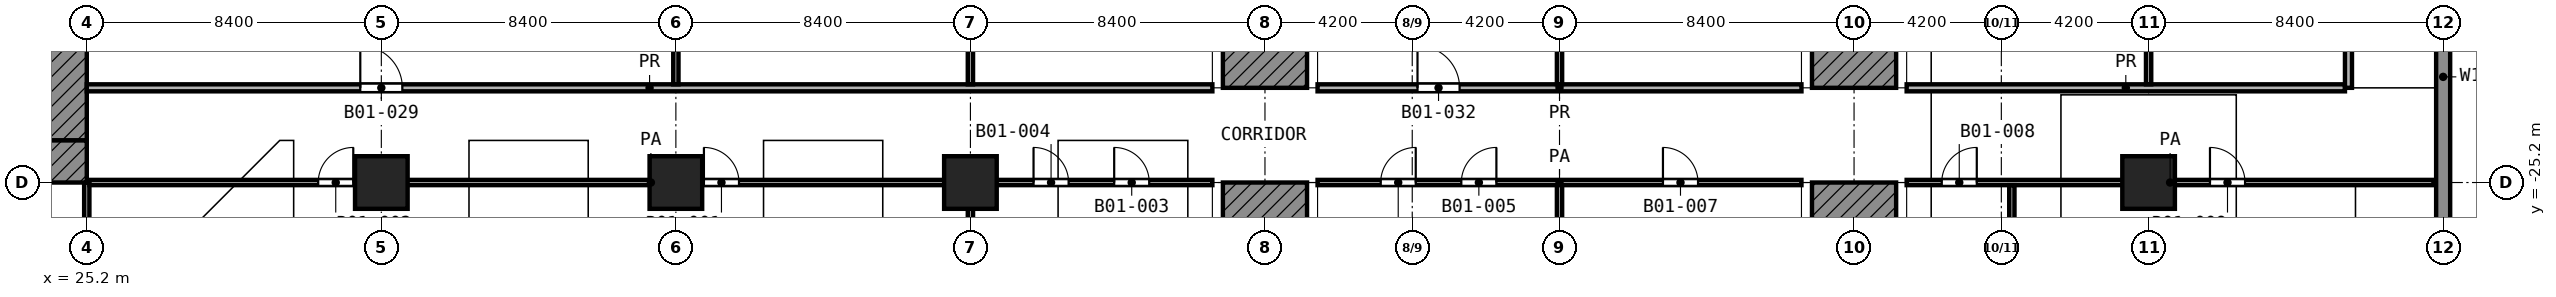
"""IFC4 building model, lengths in metres.
Left out: names, types, materials, properties, quantities, classifications, styles, units other than length and angle.
Written with IfcOpenShell. Run it as: python <this file> out.ifc"""

import sys

from ifc_helpers import new_model, si_unit, direction, frame, frame_2d, origin, origin_2d, place, context, subcontext, project, spatial, polyline, rectangle, outline, extrude, element, fill, save


model = new_model("IFC4")
c1 = context("Model", 3, precision=1e-05, world=origin(), true_north=direction((0.0, 1.0)))
c2 = subcontext(c1, "Body", "Model", "MODEL_VIEW")
j1 = project(units=[si_unit("LENGTHUNIT", "METRE"), si_unit("PLANEANGLEUNIT", "RADIAN")], contexts=[c1])
p1 = place(None, origin())
s1 = spatial("IfcSite", under=j1, at=p1, CompositionType="ELEMENT")
p2 = place(p1, origin())
s2 = spatial("IfcBuilding", under=s1, at=p2, CompositionType="ELEMENT")
p3 = place(p2, frame((0.0, 0.0, -6.0)))
s3 = spatial("IfcBuildingStorey", under=s2, at=p3, CompositionType="ELEMENT", Elevation=-6.0)
p4 = place(p3, origin())
e1 = element("IfcWall", 1, at=p4, inside=s3, PredefinedType="SOLIDWALL", context=c2, shape_type="SweptSolid", body=[
    extrude(outline(polyline([(92.2, -26.875), (92.2, -17.5), (92.6, -17.5), (92.6, -26.875), (92.2, -26.875)])), origin(), (0.0, 0.0, 1.0), 5.55),
])
for number, where, z_axis, x_axis in (
    (2, (33.6, -25.2, 0.0), (0.0, 0.0, 1.0), (1.0, 0.0, 0.0)),
    (3, (42.0, -25.2, 0.0), (0.0, 0.0, 1.0), (1.0, 0.0, 0.0)),
    (4, (50.4, -25.2, 0.0), (0.0, 0.0, 1.0), (1.0, 0.0, 0.0)),
    (5, (84.0, -25.2, 0.0), (0.0, 0.0, 1.0), (1.0, 0.0, 0.0)),
):
    element("IfcColumn", number, at=place(p3, frame(where, z_axis=z_axis, x_axis=x_axis)), inside=s3, PredefinedType="COLUMN", context=c2, shape_type="SweptSolid", body=[
        extrude(rectangle(XDim=1.5, YDim=1.5, at=origin_2d()), origin(), (0.0, 0.0, 1.0), 6.0),
    ])
p5 = place(p3, frame((0.0, -11.1, 6.0), z_axis=(0.0, -1.0, 0.0), x_axis=(1.0, 0.0, 0.0)))
e6 = element("IfcWall", 6, at=p5, inside=s3, PredefinedType="SHEAR", context=c2, shape_type="SweptSolid", body=[
    extrude(outline(polyline([(60.0, 0.0), (60.0, -6.0), (57.6, -6.0), (57.6, 0.0), (60.0, 0.0)])), origin(), (0.0, 0.0, 1.0), 11.4),
])
p6 = place(p3, frame((0.0, -25.2, 6.0), z_axis=(0.0, -1.0, 0.0), x_axis=(1.0, 0.0, 0.0)))
e7 = element("IfcWall", 7, at=p6, inside=s3, PredefinedType="SHEAR", context=c2, shape_type="SweptSolid", body=[
    extrude(outline(polyline([(60.0, 0.0), (60.0, -6.0), (57.6, -6.0), (57.6, 0.0), (60.0, 0.0)])), origin(), (0.0, 0.0, 1.0), 8.4),
])
e8 = element("IfcWall", 8, at=p5, inside=s3, PredefinedType="SHEAR", context=c2, shape_type="SweptSolid", body=[
    extrude(outline(polyline([(74.4, -6.0), (74.4, 0.0), (76.8, 0.0), (76.8, -6.0), (74.4, -6.0)])), origin(), (0.0, 0.0, 1.0), 11.4),
])
e9 = element("IfcWall", 9, at=p6, inside=s3, PredefinedType="SHEAR", context=c2, shape_type="SweptSolid", body=[
    extrude(outline(polyline([(74.4, -6.0), (74.4, 0.0), (76.8, 0.0), (76.8, -6.0), (74.4, -6.0)])), origin(), (0.0, 0.0, 1.0), 8.4),
])
p7 = place(p3, frame((24.6, -24.0, 0.0), z_axis=(0.0, 0.0, 1.0), x_axis=(0.0, 1.0, 0.0)))
e10 = element("IfcWall", 10, at=p7, inside=s3, PredefinedType="SHEAR", context=c2, shape_type="SweptSolid", body=[
    extrude(rectangle(XDim=18.6, YDim=1.2, at=frame_2d((9.3, 0.0))), origin(), (0.0, 0.0, 1.0), 5.55),
])
p8 = place(p7, frame((10.5, 0.0, 0.0)))
e11 = element("IfcOpeningElement", 11, at=p8, cuts=e10, PredefinedType="OPENING", context=c2, shape_type="SweptSolid", body=[
    extrude(rectangle(XDim=1.8, YDim=2.1, at=frame_2d((0.9, 1.05))), frame((0.0, 0.61, 0.0), z_axis=(0.0, -1.0, 0.0), x_axis=(1.0, 0.0, 0.0)), (0.0, 0.0, 1.0), 1.22),
])
p9 = place(p3, frame((24.6, -25.2, 0.0), z_axis=(0.0, 0.0, 1.0), x_axis=(0.0, 1.0, 0.0)))
e12 = element("IfcWall", 12, at=p9, inside=s3, PredefinedType="SHEAR", context=c2, shape_type="SweptSolid", body=[
    extrude(rectangle(XDim=1.2, YDim=1.2, at=frame_2d((0.6, 0.0))), origin(), (0.0, 0.0, 1.0), 5.55),
])
p10 = place(p3, frame((25.275, -25.2, 0.0), z_axis=(0.0, 0.0, 1.0), x_axis=(1.0, 0.0, 0.0)))
e13 = element("IfcWall", 13, at=p10, inside=s3, PredefinedType="PARTITIONING", context=c2, shape_type="SweptSolid", body=[
    extrude(rectangle(XDim=32.025, YDim=0.15, at=frame_2d((16.013, 0.0))), origin(), (0.0, 0.0, 1.0), 5.55),
])
p11 = place(p10, frame((17.525, 0.0, 0.0)))
e14 = element("IfcOpeningElement", 14, at=p11, cuts=e13, PredefinedType="OPENING", context=c2, shape_type="SweptSolid", body=[
    extrude(rectangle(XDim=1.0, YDim=2.1, at=frame_2d((0.5, 1.05))), frame((0.0, 0.085, 0.0), z_axis=(0.0, -1.0, 0.0), x_axis=(1.0, 0.0, 0.0)), (0.0, 0.0, 1.0), 0.17),
])
p12 = place(p10, frame((6.525, 0.0, 0.0)))
e15 = element("IfcOpeningElement", 15, at=p12, cuts=e13, PredefinedType="OPENING", context=c2, shape_type="SweptSolid", body=[
    extrude(rectangle(XDim=1.0, YDim=2.1, at=frame_2d((0.5, 1.05))), frame((0.0, 0.085, 0.0), z_axis=(0.0, -1.0, 0.0), x_axis=(1.0, 0.0, 0.0)), (0.0, 0.0, 1.0), 0.17),
])
p13 = place(p10, frame((29.225, 0.0, 0.0)))
e16 = element("IfcOpeningElement", 16, at=p13, cuts=e13, PredefinedType="OPENING", context=c2, shape_type="SweptSolid", body=[
    extrude(rectangle(XDim=1.0, YDim=2.1, at=frame_2d((0.5, 1.05))), frame((0.0, 0.085, 0.0), z_axis=(0.0, -1.0, 0.0), x_axis=(1.0, 0.0, 0.0)), (0.0, 0.0, 1.0), 0.17),
])
p14 = place(p10, frame((26.925, 0.0, 0.0)))
e17 = element("IfcOpeningElement", 17, at=p14, cuts=e13, PredefinedType="OPENING", context=c2, shape_type="SweptSolid", body=[
    extrude(rectangle(XDim=1.0, YDim=2.1, at=frame_2d((0.5, 1.05))), frame((0.0, 0.085, 0.0), z_axis=(0.0, -1.0, 0.0), x_axis=(1.0, 0.0, 0.0)), (0.0, 0.0, 1.0), 0.17),
])
p15 = place(p3, frame((60.3, -25.2, 0.0), z_axis=(0.0, 0.0, 1.0), x_axis=(1.0, 0.0, 0.0)))
e18 = element("IfcWall", 18, at=p15, inside=s3, PredefinedType="PARTITIONING", context=c2, shape_type="SweptSolid", body=[
    extrude(rectangle(XDim=13.8, YDim=0.15, at=frame_2d((6.9, 0.0))), origin(), (0.0, 0.0, 1.0), 5.55),
])
p16 = place(p15, frame((4.1, 0.0, 0.0)))
e19 = element("IfcOpeningElement", 19, at=p16, cuts=e18, PredefinedType="OPENING", context=c2, shape_type="SweptSolid", body=[
    extrude(rectangle(XDim=1.0, YDim=2.1, at=frame_2d((0.5, 1.05))), frame((0.0, 0.085, 0.0), z_axis=(0.0, -1.0, 0.0), x_axis=(1.0, 0.0, 0.0)), (0.0, 0.0, 1.0), 0.17),
])
p17 = place(p15, frame((1.8, 0.0, 0.0)))
e20 = element("IfcOpeningElement", 20, at=p17, cuts=e18, PredefinedType="OPENING", context=c2, shape_type="SweptSolid", body=[
    extrude(rectangle(XDim=1.0, YDim=2.1, at=frame_2d((0.5, 1.05))), frame((0.0, 0.085, 0.0), z_axis=(0.0, -1.0, 0.0), x_axis=(1.0, 0.0, 0.0)), (0.0, 0.0, 1.0), 0.17),
])
p18 = place(p15, frame((9.85, 0.0, 0.0)))
e21 = element("IfcOpeningElement", 21, at=p18, cuts=e18, PredefinedType="OPENING", context=c2, shape_type="SweptSolid", body=[
    extrude(rectangle(XDim=1.0, YDim=2.1, at=frame_2d((0.5, 1.05))), frame((0.0, 0.085, 0.0), z_axis=(0.0, -1.0, 0.0), x_axis=(1.0, 0.0, 0.0)), (0.0, 0.0, 1.0), 0.17),
])
p19 = place(p3, frame((77.1, -25.2, 0.0), z_axis=(0.0, 0.0, 1.0), x_axis=(1.0, 0.0, 0.0)))
e22 = element("IfcWall", 22, at=p19, inside=s3, PredefinedType="PARTITIONING", context=c2, shape_type="SweptSolid", body=[
    extrude(rectangle(XDim=15.026, YDim=0.15, at=frame_2d((7.513, 0.0))), origin(), (0.0, 0.0, 1.0), 5.55),
])
p20 = place(p19, frame((1.0, 0.0, 0.0)))
e23 = element("IfcOpeningElement", 23, at=p20, cuts=e22, PredefinedType="OPENING", context=c2, shape_type="SweptSolid", body=[
    extrude(rectangle(XDim=1.0, YDim=2.1, at=frame_2d((0.5, 1.05))), frame((0.0, 0.085, 0.0), z_axis=(0.0, -1.0, 0.0), x_axis=(1.0, 0.0, 0.0)), (0.0, 0.0, 1.0), 0.17),
])
p21 = place(p19, frame((8.65, 0.0, 0.0)))
e24 = element("IfcOpeningElement", 24, at=p21, cuts=e22, PredefinedType="OPENING", context=c2, shape_type="SweptSolid", body=[
    extrude(rectangle(XDim=1.0, YDim=2.1, at=frame_2d((0.5, 1.05))), frame((0.0, 0.085, 0.0), z_axis=(0.0, -1.0, 0.0), x_axis=(1.0, 0.0, 0.0)), (0.0, 0.0, 1.0), 0.17),
])
p22 = place(p3, frame((25.2, -81.3, 0.0), z_axis=(0.0, 0.0, 1.0), x_axis=(0.0, 1.0, 0.0)))
e25 = element("IfcWall", 25, at=p22, inside=s3, PredefinedType="PARTITIONING", context=c2, shape_type="SweptSolid", body=[
    extrude(rectangle(XDim=56.1, YDim=0.15, at=frame_2d((28.05, 0.0))), origin(), (0.0, 0.0, 1.0), 5.55),
])
p23 = place(p22, frame((37.5, 0.0, 0.0)))
e26 = element("IfcOpeningElement", 26, at=p23, cuts=e25, PredefinedType="OPENING", context=c2, shape_type="SweptSolid", body=[
    extrude(rectangle(XDim=1.0, YDim=2.1, at=frame_2d((0.5, 1.05))), frame((0.0, 0.085, 0.0), z_axis=(0.0, -1.0, 0.0), x_axis=(1.0, 0.0, 0.0)), (0.0, 0.0, 1.0), 0.17),
])
p24 = place(p22, frame((34.0, 0.0, 0.0)))
e27 = element("IfcOpeningElement", 27, at=p24, cuts=e25, PredefinedType="OPENING", context=c2, shape_type="SweptSolid", body=[
    extrude(rectangle(XDim=1.0, YDim=2.1, at=frame_2d((0.5, 1.05))), frame((0.0, 0.085, 0.0), z_axis=(0.0, -1.0, 0.0), x_axis=(1.0, 0.0, 0.0)), (0.0, 0.0, 1.0), 0.17),
])
p25 = place(p22, frame((26.2, 0.0, 0.0)))
e28 = element("IfcOpeningElement", 28, at=p25, cuts=e25, PredefinedType="OPENING", context=c2, shape_type="SweptSolid", body=[
    extrude(rectangle(XDim=1.0, YDim=2.1, at=frame_2d((0.5, 1.05))), frame((0.0, 0.085, 0.0), z_axis=(0.0, -1.0, 0.0), x_axis=(1.0, 0.0, 0.0)), (0.0, 0.0, 1.0), 0.17),
])
p26 = place(p22, frame((17.8, 0.0, 0.0)))
e29 = element("IfcOpeningElement", 29, at=p26, cuts=e25, PredefinedType="OPENING", context=c2, shape_type="SweptSolid", body=[
    extrude(rectangle(XDim=1.0, YDim=2.1, at=frame_2d((0.5, 1.05))), frame((0.0, 0.085, 0.0), z_axis=(0.0, -1.0, 0.0), x_axis=(1.0, 0.0, 0.0)), (0.0, 0.0, 1.0), 0.17),
])
p27 = place(p22, frame((11.65, 0.0, 0.0)))
e30 = element("IfcOpeningElement", 30, at=p27, cuts=e25, PredefinedType="OPENING", context=c2, shape_type="SweptSolid", body=[
    extrude(rectangle(XDim=1.0, YDim=2.1, at=frame_2d((0.5, 1.05))), frame((0.0, 0.085, 0.0), z_axis=(0.0, -1.0, 0.0), x_axis=(1.0, 0.0, 0.0)), (0.0, 0.0, 1.0), 0.17),
])
p28 = place(p22, frame((3.9, 0.0, 0.0)))
e31 = element("IfcOpeningElement", 31, at=p28, cuts=e25, PredefinedType="OPENING", context=c2, shape_type="SweptSolid", body=[
    extrude(rectangle(XDim=1.0, YDim=2.1, at=frame_2d((0.5, 1.05))), frame((0.0, 0.085, 0.0), z_axis=(0.0, -1.0, 0.0), x_axis=(1.0, 0.0, 0.0)), (0.0, 0.0, 1.0), 0.17),
])
p29 = place(p3, frame((42.0, -22.4, 0.0), z_axis=(0.0, 0.0, 1.0), x_axis=(0.0, 1.0, 0.0)))
e32 = element("IfcWall", 32, at=p29, inside=s3, PredefinedType="PARTITIONING", context=c2, shape_type="SweptSolid", body=[
    extrude(rectangle(XDim=11.2, YDim=0.15, at=frame_2d((5.6, 0.0))), origin(), (0.0, 0.0, 1.0), 5.55),
])
p30 = place(p3, frame((50.4, -33.52, 0.0), z_axis=(0.0, 0.0, 1.0), x_axis=(0.0, 1.0, 0.0)))
e33 = element("IfcWall", 33, at=p30, inside=s3, PredefinedType="PARTITIONING", context=c2, shape_type="SweptSolid", body=[
    extrude(rectangle(XDim=8.245, YDim=0.15, at=frame_2d((4.123, 0.0))), origin(), (0.0, 0.0, 1.0), 5.55),
])
p31 = place(p3, frame((50.4, -22.4, 0.0), z_axis=(0.0, 0.0, 1.0), x_axis=(0.0, 1.0, 0.0)))
e34 = element("IfcWall", 34, at=p31, inside=s3, PredefinedType="PARTITIONING", context=c2, shape_type="SweptSolid", body=[
    extrude(rectangle(XDim=11.2, YDim=0.15, at=frame_2d((5.6, 0.0))), origin(), (0.0, 0.0, 1.0), 5.55),
])
p32 = place(p3, frame((67.2, -33.326, 0.0), z_axis=(0.0, 0.0, 1.0), x_axis=(0.0, 1.0, 0.0)))
e35 = element("IfcWall", 35, at=p32, inside=s3, PredefinedType="PARTITIONING", context=c2, shape_type="SweptSolid", body=[
    extrude(rectangle(XDim=8.051, YDim=0.15, at=frame_2d((4.025, 0.0))), origin(), (0.0, 0.0, 1.0), 5.55),
])
p33 = place(p3, frame((67.2, -22.4, 0.0), z_axis=(0.0, 0.0, 1.0), x_axis=(0.0, 1.0, 0.0)))
e36 = element("IfcWall", 36, at=p33, inside=s3, PredefinedType="PARTITIONING", context=c2, shape_type="SweptSolid", body=[
    extrude(rectangle(XDim=11.2, YDim=0.15, at=frame_2d((5.6, 0.0))), origin(), (0.0, 0.0, 1.0), 5.55),
])
p34 = place(p3, frame((80.1, -33.326, 0.0), z_axis=(0.0, 0.0, 1.0), x_axis=(0.0, 1.0, 0.0)))
e37 = element("IfcWall", 37, at=p34, inside=s3, PredefinedType="PARTITIONING", context=c2, shape_type="SweptSolid", body=[
    extrude(rectangle(XDim=8.051, YDim=0.15, at=frame_2d((4.025, 0.0))), origin(), (0.0, 0.0, 1.0), 5.55),
])
p35 = place(p3, frame((84.0, -22.4, 0.0), z_axis=(0.0, 0.0, 1.0), x_axis=(0.0, 1.0, 0.0)))
e38 = element("IfcWall", 38, at=p35, inside=s3, PredefinedType="PARTITIONING", context=c2, shape_type="SweptSolid", body=[
    extrude(rectangle(XDim=11.2, YDim=0.15, at=frame_2d((5.6, 0.0))), origin(), (0.0, 0.0, 1.0), 5.55),
])
p36 = place(p3, frame((25.2, -22.5, 0.0), z_axis=(0.0, 0.0, 1.0), x_axis=(1.0, 0.0, 0.0)))
e39 = element("IfcWall", 39, at=p36, inside=s3, PredefinedType="PARTITIONING", context=c2, shape_type="SweptSolid", body=[
    extrude(rectangle(XDim=32.1, YDim=0.2, at=frame_2d((16.05, 0.0))), origin(), (0.0, 0.0, 1.0), 5.55),
])
p37 = place(p36, frame((7.8, 0.0, 0.0)))
e40 = element("IfcOpeningElement", 40, at=p37, cuts=e39, PredefinedType="OPENING", context=c2, shape_type="SweptSolid", body=[
    extrude(rectangle(XDim=1.2, YDim=2.1, at=frame_2d((0.6, 1.05))), frame((0.0, 0.11, 0.0), z_axis=(0.0, -1.0, 0.0), x_axis=(1.0, 0.0, 0.0)), (0.0, 0.0, 1.0), 0.22),
])
p38 = place(p3, frame((60.3, -22.5, 0.0), z_axis=(0.0, 0.0, 1.0), x_axis=(1.0, 0.0, 0.0)))
e41 = element("IfcWall", 41, at=p38, inside=s3, PredefinedType="PARTITIONING", context=c2, shape_type="SweptSolid", body=[
    extrude(rectangle(XDim=13.8, YDim=0.2, at=frame_2d((6.9, 0.0))), origin(), (0.0, 0.0, 1.0), 5.55),
])
p39 = place(p38, frame((2.85, 0.0, 0.0)))
e42 = element("IfcOpeningElement", 42, at=p39, cuts=e41, PredefinedType="OPENING", context=c2, shape_type="SweptSolid", body=[
    extrude(rectangle(XDim=1.2, YDim=2.1, at=frame_2d((0.6, 1.05))), frame((0.0, 0.11, 0.0), z_axis=(0.0, -1.0, 0.0), x_axis=(1.0, 0.0, 0.0)), (0.0, 0.0, 1.0), 0.22),
])
p40 = place(p3, frame((77.1, -22.5, 0.0), z_axis=(0.0, 0.0, 1.0), x_axis=(1.0, 0.0, 0.0)))
e43 = element("IfcWall", 43, at=p40, inside=s3, PredefinedType="PARTITIONING", context=c2, shape_type="SweptSolid", body=[
    extrude(rectangle(XDim=12.5, YDim=0.2, at=frame_2d((6.25, 0.0))), origin(), (0.0, 0.0, 1.0), 5.55),
])
p41 = place(p3, frame((89.7, -22.5, 0.0), z_axis=(0.0, 0.0, 1.0), x_axis=(0.0, 1.0, 0.0)))
e44 = element("IfcWall", 44, at=p41, inside=s3, PredefinedType="PARTITIONING", context=c2, shape_type="SweptSolid", body=[
    extrude(rectangle(XDim=11.4, YDim=0.2, at=frame_2d((5.7, 0.0))), origin(), (0.0, 0.0, 1.0), 5.55),
])
p42 = place(p37, origin())
e45 = element("IfcDoor", 45, at=p42, inside=s3, OperationType="SINGLE_SWING_LEFT", PredefinedType="DOOR", context=c2, shape_type="SweptSolid", body=[
    extrude(rectangle(XDim=1.2, YDim=2.1, at=frame_2d((0.6, 1.05))), frame((0.0, 0.025, 0.0), z_axis=(0.0, -1.0, 0.0), x_axis=(1.0, 0.0, 0.0)), (0.0, 0.0, 1.0), 0.05),
])
fill(e40, e45)
p43 = place(p39, origin())
e46 = element("IfcDoor", 46, at=p43, inside=s3, OperationType="SINGLE_SWING_LEFT", PredefinedType="DOOR", context=c2, shape_type="SweptSolid", body=[
    extrude(rectangle(XDim=1.2, YDim=2.1, at=frame_2d((0.6, 1.05))), frame((0.0, 0.025, 0.0), z_axis=(0.0, -1.0, 0.0), x_axis=(1.0, 0.0, 0.0)), (0.0, 0.0, 1.0), 0.05),
])
fill(e42, e46)
p44 = place(p11, origin())
e47 = element("IfcDoor", 47, at=p44, inside=s3, OperationType="SINGLE_SWING_LEFT", PredefinedType="DOOR", context=c2, shape_type="SweptSolid", body=[
    extrude(rectangle(XDim=1.0, YDim=2.1, at=frame_2d((0.5, 1.05))), frame((0.0, 0.025, 0.0), z_axis=(0.0, -1.0, 0.0), x_axis=(1.0, 0.0, 0.0)), (0.0, 0.0, 1.0), 0.05),
])
fill(e14, e47)
p45 = place(p12, origin())
e48 = element("IfcDoor", 48, at=p45, inside=s3, OperationType="SINGLE_SWING_RIGHT", PredefinedType="DOOR", context=c2, shape_type="SweptSolid", body=[
    extrude(rectangle(XDim=1.0, YDim=2.1, at=frame_2d((0.5, 1.05))), frame((0.0, 0.025, 0.0), z_axis=(0.0, -1.0, 0.0), x_axis=(1.0, 0.0, 0.0)), (0.0, 0.0, 1.0), 0.05),
])
fill(e15, e48)
p46 = place(p13, origin())
e49 = element("IfcDoor", 49, at=p46, inside=s3, OperationType="SINGLE_SWING_LEFT", PredefinedType="DOOR", context=c2, shape_type="SweptSolid", body=[
    extrude(rectangle(XDim=1.0, YDim=2.1, at=frame_2d((0.5, 1.05))), frame((0.0, 0.025, 0.0), z_axis=(0.0, -1.0, 0.0), x_axis=(1.0, 0.0, 0.0)), (0.0, 0.0, 1.0), 0.05),
])
fill(e16, e49)
p47 = place(p14, origin())
e50 = element("IfcDoor", 50, at=p47, inside=s3, OperationType="SINGLE_SWING_LEFT", PredefinedType="DOOR", context=c2, shape_type="SweptSolid", body=[
    extrude(rectangle(XDim=1.0, YDim=2.1, at=frame_2d((0.5, 1.05))), frame((0.0, 0.025, 0.0), z_axis=(0.0, -1.0, 0.0), x_axis=(1.0, 0.0, 0.0)), (0.0, 0.0, 1.0), 0.05),
])
fill(e17, e50)
p48 = place(p16, origin())
e51 = element("IfcDoor", 51, at=p48, inside=s3, OperationType="SINGLE_SWING_RIGHT", PredefinedType="DOOR", context=c2, shape_type="SweptSolid", body=[
    extrude(rectangle(XDim=1.0, YDim=2.1, at=frame_2d((0.5, 1.05))), frame((0.0, 0.025, 0.0), z_axis=(0.0, -1.0, 0.0), x_axis=(1.0, 0.0, 0.0)), (0.0, 0.0, 1.0), 0.05),
])
fill(e19, e51)
p49 = place(p17, origin())
e52 = element("IfcDoor", 52, at=p49, inside=s3, OperationType="SINGLE_SWING_RIGHT", PredefinedType="DOOR", context=c2, shape_type="SweptSolid", body=[
    extrude(rectangle(XDim=1.0, YDim=2.1, at=frame_2d((0.5, 1.05))), frame((0.0, 0.025, 0.0), z_axis=(0.0, -1.0, 0.0), x_axis=(1.0, 0.0, 0.0)), (0.0, 0.0, 1.0), 0.05),
])
fill(e20, e52)
p50 = place(p18, origin())
e53 = element("IfcDoor", 53, at=p50, inside=s3, OperationType="SINGLE_SWING_LEFT", PredefinedType="DOOR", context=c2, shape_type="SweptSolid", body=[
    extrude(rectangle(XDim=1.0, YDim=2.1, at=frame_2d((0.5, 1.05))), frame((0.0, 0.025, 0.0), z_axis=(0.0, -1.0, 0.0), x_axis=(1.0, 0.0, 0.0)), (0.0, 0.0, 1.0), 0.05),
])
fill(e21, e53)
p51 = place(p20, origin())
e54 = element("IfcDoor", 54, at=p51, inside=s3, OperationType="SINGLE_SWING_RIGHT", PredefinedType="DOOR", context=c2, shape_type="SweptSolid", body=[
    extrude(rectangle(XDim=1.0, YDim=2.1, at=frame_2d((0.5, 1.05))), frame((0.0, 0.025, 0.0), z_axis=(0.0, -1.0, 0.0), x_axis=(1.0, 0.0, 0.0)), (0.0, 0.0, 1.0), 0.05),
])
fill(e23, e54)
p52 = place(p21, origin())
e55 = element("IfcDoor", 55, at=p52, inside=s3, OperationType="SINGLE_SWING_LEFT", PredefinedType="DOOR", context=c2, shape_type="SweptSolid", body=[
    extrude(rectangle(XDim=1.0, YDim=2.1, at=frame_2d((0.5, 1.05))), frame((0.0, 0.025, 0.0), z_axis=(0.0, -1.0, 0.0), x_axis=(1.0, 0.0, 0.0)), (0.0, 0.0, 1.0), 0.05),
])
fill(e24, e55)
save(model, sys.argv[1])
